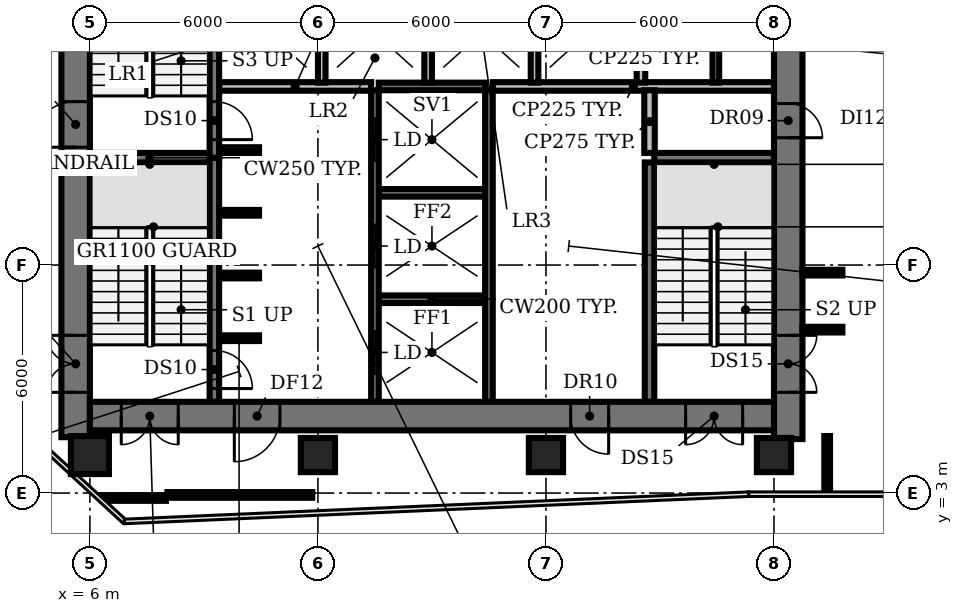
"""IFC4 building model, lengths in metres.
Left out: names, types, materials, properties, quantities, classifications, styles, units other than length and angle.
Written with IfcOpenShell. Run it as: python <this file> out.ifc"""

import sys

from ifc_helpers import new_model, si_unit, direction, frame, frame_2d, origin, origin_2d, place, context, subcontext, project, spatial, rectangle, circle, extrude, element, fill, save


model = new_model("IFC4")
c1 = context("Model", 3, precision=1e-05, world=origin(), true_north=direction((0.0, 1.0)))
c2 = subcontext(c1, "Body", "Model", "MODEL_VIEW")
j1 = project(units=[si_unit("LENGTHUNIT", "METRE"), si_unit("PLANEANGLEUNIT", "RADIAN")], contexts=[c1])
p1 = place(None, origin())
s1 = spatial("IfcSite", under=j1, at=p1, CompositionType="ELEMENT")
p2 = place(p1, origin())
s2 = spatial("IfcBuilding", under=s1, at=p2, CompositionType="ELEMENT")
p3 = place(p2, frame((0.0, 0.0, 100.4)))
s3 = spatial("IfcBuildingStorey", under=s2, at=p3, CompositionType="ELEMENT", Elevation=100.4)
p4 = place(p3, frame((6.0, 4.0, 0.0), z_axis=(0.0, 0.0, 1.0), x_axis=(1.0, 0.0, 0.0)))
e1 = element("IfcColumn", 1, at=p4, inside=s3, PredefinedType="COLUMN", context=c2, shape_type="SweptSolid", body=[
    extrude(circle(Radius=0.5, at=origin_2d()), origin(), (0.0, 0.0, 1.0), 3.85),
])
for number, where, z_axis, x_axis in (
    (2, (12.0, 4.0, 0.0), (0.0, 0.0, 1.0), (1.0, 0.0, 0.0)),
    (3, (18.0, 4.0, 0.0), (0.0, 0.0, 1.0), (1.0, 0.0, 0.0)),
    (4, (24.0, 4.0, 0.0), (0.0, 0.0, 1.0), (1.0, 0.0, 0.0)),
):
    element("IfcColumn", number, at=place(p3, frame(where, z_axis=z_axis, x_axis=x_axis)), inside=s3, PredefinedType="COLUMN", context=c2, shape_type="SweptSolid", body=[
        extrude(rectangle(XDim=0.9, YDim=0.9, at=origin_2d()), origin(), (0.0, 0.0, 1.0), 3.85),
    ])
p5 = place(p3, frame((9.4, 7.075, 0.0), z_axis=(0.0, 0.0, 1.0), x_axis=(1.0, 0.0, 0.0)))
e5 = element("IfcWall", 5, at=p5, inside=s3, PredefinedType="SHEAR", context=c2, shape_type="SweptSolid", body=[
    extrude(rectangle(XDim=1.05, YDim=0.15, at=frame_2d((0.525, 0.0))), origin(), (0.0, 0.0, 1.0), 3.85),
])
p6 = place(p3, frame((13.6, 8.1, 0.0), z_axis=(0.0, 0.0, 1.0), x_axis=(1.0, 0.0, 0.0)))
e6 = element("IfcWall", 6, at=p6, inside=s3, PredefinedType="SHEAR", context=c2, shape_type="SweptSolid", body=[
    extrude(rectangle(XDim=2.8, YDim=0.2, at=frame_2d((1.4, 0.0))), origin(), (0.0, 0.0, 1.0), 3.85),
])
for number, where, z_axis, x_axis in (
    (7, (9.4, 8.725, 0.0), (0.0, 0.0, 1.0), (1.0, 0.0, 0.0)),
    (8, (9.4, 10.375, 0.0), (0.0, 0.0, 1.0), (1.0, 0.0, 0.0)),
):
    element("IfcWall", number, at=place(p3, frame(where, z_axis=z_axis, x_axis=x_axis)), inside=s3, PredefinedType="SHEAR", context=c2, shape_type="SweptSolid", body=[
        extrude(rectangle(XDim=1.05, YDim=0.15, at=frame_2d((0.525, 0.0))), origin(), (0.0, 0.0, 1.0), 3.85),
    ])
p7 = place(p3, frame((13.6, 10.9, 0.0), z_axis=(0.0, 0.0, 1.0), x_axis=(1.0, 0.0, 0.0)))
e9 = element("IfcWall", 9, at=p7, inside=s3, PredefinedType="SHEAR", context=c2, shape_type="SweptSolid", body=[
    extrude(rectangle(XDim=2.8, YDim=0.2, at=frame_2d((1.4, 0.0))), origin(), (0.0, 0.0, 1.0), 3.85),
])
for number, where, z_axis, x_axis in (
    (10, (6.0, 11.825, 0.0), (0.0, 0.0, 1.0), (1.0, 0.0, 0.0)),
    (11, (20.85, 11.825, 0.0), (0.0, 0.0, 1.0), (1.0, 0.0, 0.0)),
):
    element("IfcWall", number, at=place(p3, frame(where, z_axis=z_axis, x_axis=x_axis)), inside=s3, PredefinedType="SHEAR", context=c2, shape_type="SweptSolid", body=[
        extrude(rectangle(XDim=3.15, YDim=0.25, at=frame_2d((1.575, 0.0))), origin(), (0.0, 0.0, 1.0), 3.85),
    ])
p8 = place(p3, frame((9.4, 12.025, 0.0), z_axis=(0.0, 0.0, 1.0), x_axis=(1.0, 0.0, 0.0)))
e12 = element("IfcWall", 12, at=p8, inside=s3, PredefinedType="SHEAR", context=c2, shape_type="SweptSolid", body=[
    extrude(rectangle(XDim=1.05, YDim=0.15, at=frame_2d((0.525, 0.0))), origin(), (0.0, 0.0, 1.0), 3.85),
])
p9 = place(p3, frame((9.4, 13.7, 0.0), z_axis=(0.0, 0.0, 1.0), x_axis=(1.0, 0.0, 0.0)))
e13 = element("IfcWall", 13, at=p9, inside=s3, PredefinedType="PARTITIONING", context=c2, shape_type="SweptSolid", body=[
    extrude(rectangle(XDim=4.0, YDim=0.225, at=frame_2d((2.0, 0.0))), origin(), (0.0, 0.0, 1.0), 3.85),
])
p10 = place(p3, frame((13.6, 13.7, 0.0), z_axis=(0.0, 0.0, 1.0), x_axis=(1.0, 0.0, 0.0)))
e14 = element("IfcWall", 14, at=p10, inside=s3, PredefinedType="SHEAR", context=c2, shape_type="SweptSolid", body=[
    extrude(rectangle(XDim=2.8, YDim=0.2, at=frame_2d((1.4, 0.0))), origin(), (0.0, 0.0, 1.0), 3.85),
])
p11 = place(p3, frame((16.6, 13.7, 0.0), z_axis=(0.0, 0.0, 1.0), x_axis=(1.0, 0.0, 0.0)))
e15 = element("IfcWall", 15, at=p11, inside=s3, PredefinedType="PARTITIONING", context=c2, shape_type="SweptSolid", body=[
    extrude(rectangle(XDim=7.4, YDim=0.225, at=frame_2d((3.7, 0.0))), origin(), (0.0, 0.0, 1.0), 3.85),
])
p12 = place(p3, frame((9.275, 11.825, 0.0), z_axis=(0.0, 0.0, 1.0), x_axis=(0.0, -1.0, 0.0)))
e16 = element("IfcWall", 16, at=p12, inside=s3, PredefinedType="SHEAR", context=c2, shape_type="SweptSolid", body=[
    extrude(rectangle(XDim=6.425, YDim=0.25, at=frame_2d((3.212, 0.0))), origin(), (0.0, 0.0, 1.0), 3.85),
])
p13 = place(p12, frame((5.075, 0.0, 0.0)))
e17 = element("IfcOpeningElement", 17, at=p13, cuts=e16, PredefinedType="OPENING", context=c2, shape_type="SweptSolid", body=[
    extrude(rectangle(XDim=1.0, YDim=2.1, at=frame_2d((0.5, 1.05))), frame((0.0, 0.135, 0.0), z_axis=(0.0, -1.0, 0.0), x_axis=(1.0, 0.0, 0.0)), (0.0, 0.0, 1.0), 0.27),
])
p14 = place(p3, frame((9.275, 18.375, 0.0), z_axis=(0.0, 0.0, 1.0), x_axis=(0.0, -1.0, 0.0)))
e18 = element("IfcWall", 18, at=p14, inside=s3, PredefinedType="SHEAR", context=c2, shape_type="SweptSolid", body=[
    extrude(rectangle(XDim=6.55, YDim=0.25, at=frame_2d((3.275, 0.0))), origin(), (0.0, 0.0, 1.0), 3.85),
])
p15 = place(p14, frame((5.075, 0.0, 0.0)))
e19 = element("IfcOpeningElement", 19, at=p15, cuts=e18, PredefinedType="OPENING", context=c2, shape_type="SweptSolid", body=[
    extrude(rectangle(XDim=1.0, YDim=2.1, at=frame_2d((0.5, 1.05))), frame((0.0, 0.135, 0.0), z_axis=(0.0, -1.0, 0.0), x_axis=(1.0, 0.0, 0.0)), (0.0, 0.0, 1.0), 0.27),
])
p16 = place(p3, frame((12.1, 13.8, 0.0), z_axis=(0.0, 0.0, 1.0), x_axis=(0.0, 1.0, 0.0)))
e20 = element("IfcWall", 20, at=p16, inside=s3, PredefinedType="SOLIDWALL", context=c2, shape_type="SweptSolid", body=[
    extrude(rectangle(XDim=2.6, YDim=0.2, at=frame_2d((1.3, 0.0))), origin(), (0.0, 0.0, 1.0), 3.85),
])
p17 = place(p3, frame((13.5, 5.4, 0.0), z_axis=(0.0, 0.0, 1.0), x_axis=(0.0, 1.0, 0.0)))
e21 = element("IfcWall", 21, at=p17, inside=s3, PredefinedType="SHEAR", context=c2, shape_type="SweptSolid", body=[
    extrude(rectangle(XDim=8.2, YDim=0.2, at=frame_2d((4.1, 0.0))), origin(), (0.0, 0.0, 1.0), 3.85),
])
p18 = place(p17, frame((0.75, 0.0, 0.0)))
e22 = element("IfcOpeningElement", 22, at=p18, cuts=e21, PredefinedType="OPENING", context=c2, shape_type="SweptSolid", body=[
    extrude(rectangle(XDim=1.1, YDim=2.1, at=frame_2d((0.55, 1.05))), frame((0.0, 0.11, 0.0), z_axis=(0.0, -1.0, 0.0), x_axis=(1.0, 0.0, 0.0)), (0.0, 0.0, 1.0), 0.22),
])
p19 = place(p17, frame((3.55, 0.0, 0.0)))
e23 = element("IfcOpeningElement", 23, at=p19, cuts=e21, PredefinedType="OPENING", context=c2, shape_type="SweptSolid", body=[
    extrude(rectangle(XDim=1.1, YDim=2.1, at=frame_2d((0.55, 1.05))), frame((0.0, 0.11, 0.0), z_axis=(0.0, -1.0, 0.0), x_axis=(1.0, 0.0, 0.0)), (0.0, 0.0, 1.0), 0.22),
])
p20 = place(p17, frame((6.35, 0.0, 0.0)))
e24 = element("IfcOpeningElement", 24, at=p20, cuts=e21, PredefinedType="OPENING", context=c2, shape_type="SweptSolid", body=[
    extrude(rectangle(XDim=1.1, YDim=2.1, at=frame_2d((0.55, 1.05))), frame((0.0, 0.11, 0.0), z_axis=(0.0, -1.0, 0.0), x_axis=(1.0, 0.0, 0.0)), (0.0, 0.0, 1.0), 0.22),
])
p21 = place(p3, frame((14.9, 13.8, 0.0), z_axis=(0.0, 0.0, 1.0), x_axis=(0.0, 1.0, 0.0)))
e25 = element("IfcWall", 25, at=p21, inside=s3, PredefinedType="SOLIDWALL", context=c2, shape_type="SweptSolid", body=[
    extrude(rectangle(XDim=2.6, YDim=0.2, at=frame_2d((1.3, 0.0))), origin(), (0.0, 0.0, 1.0), 3.85),
])
p22 = place(p3, frame((16.5, 5.4, 0.0), z_axis=(0.0, 0.0, 1.0), x_axis=(0.0, 1.0, 0.0)))
e26 = element("IfcWall", 26, at=p22, inside=s3, PredefinedType="SHEAR", context=c2, shape_type="SweptSolid", body=[
    extrude(rectangle(XDim=8.2, YDim=0.2, at=frame_2d((4.1, 0.0))), origin(), (0.0, 0.0, 1.0), 3.85),
])
p23 = place(p3, frame((17.7, 13.8, 0.0), z_axis=(0.0, 0.0, 1.0), x_axis=(0.0, 1.0, 0.0)))
e27 = element("IfcWall", 27, at=p23, inside=s3, PredefinedType="SOLIDWALL", context=c2, shape_type="SweptSolid", body=[
    extrude(rectangle(XDim=2.6, YDim=0.2, at=frame_2d((1.3, 0.0))), origin(), (0.0, 0.0, 1.0), 3.85),
])
p24 = place(p3, frame((20.5, 13.8, 0.0), z_axis=(0.0, 0.0, 1.0), x_axis=(0.0, 1.0, 0.0)))
e28 = element("IfcWall", 28, at=p24, inside=s3, PredefinedType="PARTITIONING", context=c2, shape_type="SweptSolid", body=[
    extrude(rectangle(XDim=2.6, YDim=0.225, at=frame_2d((1.3, 0.0))), origin(), (0.0, 0.0, 1.0), 3.85),
])
p25 = place(p3, frame((20.725, 5.4, 0.0), z_axis=(0.0, 0.0, 1.0), x_axis=(0.0, 1.0, 0.0)))
e29 = element("IfcWall", 29, at=p25, inside=s3, PredefinedType="SHEAR", context=c2, shape_type="SweptSolid", body=[
    extrude(rectangle(XDim=6.3, YDim=0.25, at=frame_2d((3.15, 0.0))), origin(), (0.0, 0.0, 1.0), 3.85),
])
p26 = place(p3, frame((20.725, 11.95, 0.0), z_axis=(0.0, 0.0, 1.0), x_axis=(0.0, 1.0, 0.0)))
e30 = element("IfcWall", 30, at=p26, inside=s3, PredefinedType="PARTITIONING", context=c2, shape_type="SweptSolid", body=[
    extrude(rectangle(XDim=1.65, YDim=0.275, at=frame_2d((0.825, 0.0))), origin(), (0.0, 0.0, 1.0), 3.85),
])
p27 = place(p3, frame((22.47, 13.8, 0.0), z_axis=(0.0, 0.0, 1.0), x_axis=(0.0, 1.0, 0.0)))
e31 = element("IfcWall", 31, at=p27, inside=s3, PredefinedType="PARTITIONING", context=c2, shape_type="SweptSolid", body=[
    extrude(rectangle(XDim=2.6, YDim=0.175, at=frame_2d((1.3, 0.0))), origin(), (0.0, 0.0, 1.0), 3.85),
])
p28 = place(p3, frame((5.625, 4.47, 0.0), z_axis=(0.0, 0.0, 1.0), x_axis=(0.0, 1.0, 0.0)))
e32 = element("IfcWall", 32, at=p28, inside=s3, PredefinedType="SHEAR", context=c2, shape_type="SweptSolid", body=[
    extrude(rectangle(XDim=21.08, YDim=0.75, at=frame_2d((10.54, 0.0))), origin(), (0.0, 0.0, 1.0), 3.85),
])
p29 = place(p28, frame((1.18, 0.0, 0.0)))
e33 = element("IfcOpeningElement", 33, at=p29, cuts=e32, PredefinedType="OPENING", context=c2, shape_type="SweptSolid", body=[
    extrude(rectangle(XDim=1.5, YDim=2.1, at=frame_2d((0.75, 1.05))), frame((0.0, 0.385, 0.0), z_axis=(0.0, -1.0, 0.0), x_axis=(1.0, 0.0, 0.0)), (0.0, 0.0, 1.0), 0.77),
])
p30 = place(p28, frame((7.63, 0.0, 0.0)))
e34 = element("IfcOpeningElement", 34, at=p30, cuts=e32, PredefinedType="OPENING", context=c2, shape_type="SweptSolid", body=[
    extrude(rectangle(XDim=1.2, YDim=2.1, at=frame_2d((0.6, 1.05))), frame((0.0, 0.385, 0.0), z_axis=(0.0, -1.0, 0.0), x_axis=(1.0, 0.0, 0.0)), (0.0, 0.0, 1.0), 0.77),
])
p31 = place(p28, frame((14.18, 0.0, 0.0)))
e35 = element("IfcOpeningElement", 35, at=p31, cuts=e32, PredefinedType="OPENING", context=c2, shape_type="SweptSolid", body=[
    extrude(rectangle(XDim=1.2, YDim=2.1, at=frame_2d((0.6, 1.05))), frame((0.0, 0.385, 0.0), z_axis=(0.0, -1.0, 0.0), x_axis=(1.0, 0.0, 0.0)), (0.0, 0.0, 1.0), 0.77),
])
p32 = place(p3, frame((24.375, 25.55, 0.0), z_axis=(0.0, 0.0, 1.0), x_axis=(0.0, -1.0, 0.0)))
e36 = element("IfcWall", 36, at=p32, inside=s3, PredefinedType="SHEAR", context=c2, shape_type="SweptSolid", body=[
    extrude(rectangle(XDim=21.13, YDim=0.75, at=frame_2d((10.565, 0.0))), origin(), (0.0, 0.0, 1.0), 3.85),
])
p33 = place(p32, frame((18.4, 0.0, 0.0)))
e37 = element("IfcOpeningElement", 37, at=p33, cuts=e36, PredefinedType="OPENING", context=c2, shape_type="SweptSolid", body=[
    extrude(rectangle(XDim=1.5, YDim=2.1, at=frame_2d((0.75, 1.05))), frame((0.0, 0.385, 0.0), z_axis=(0.0, -1.0, 0.0), x_axis=(1.0, 0.0, 0.0)), (0.0, 0.0, 1.0), 0.77),
])
p34 = place(p32, frame((12.3, 0.0, 0.0)))
e38 = element("IfcOpeningElement", 38, at=p34, cuts=e36, PredefinedType="OPENING", context=c2, shape_type="SweptSolid", body=[
    extrude(rectangle(XDim=0.9, YDim=2.1, at=frame_2d((0.45, 1.05))), frame((0.0, 0.385, 0.0), z_axis=(0.0, -1.0, 0.0), x_axis=(1.0, 0.0, 0.0)), (0.0, 0.0, 1.0), 0.77),
])
p35 = place(p32, frame((6.3, 0.0, 0.0)))
e39 = element("IfcOpeningElement", 39, at=p35, cuts=e36, PredefinedType="OPENING", context=c2, shape_type="SweptSolid", body=[
    extrude(rectangle(XDim=2.0, YDim=2.1, at=frame_2d((1.0, 1.05))), frame((0.0, 0.385, 0.0), z_axis=(0.0, -1.0, 0.0), x_axis=(1.0, 0.0, 0.0)), (0.0, 0.0, 1.0), 0.77),
])
p36 = place(p3, frame((24.0, 5.025, 0.0), z_axis=(0.0, 0.0, 1.0), x_axis=(-1.0, 0.0, 0.0)))
e40 = element("IfcWall", 40, at=p36, inside=s3, PredefinedType="SHEAR", context=c2, shape_type="SweptSolid", body=[
    extrude(rectangle(XDim=18.0, YDim=0.75, at=frame_2d((9.0, 0.0))), origin(), (0.0, 0.0, 1.0), 3.85),
])
p37 = place(p36, frame((0.825, 0.0, 0.0)))
e41 = element("IfcOpeningElement", 41, at=p37, cuts=e40, PredefinedType="OPENING", context=c2, shape_type="SweptSolid", body=[
    extrude(rectangle(XDim=1.5, YDim=2.1, at=frame_2d((0.75, 1.05))), frame((0.0, 0.385, 0.0), z_axis=(0.0, -1.0, 0.0), x_axis=(1.0, 0.0, 0.0)), (0.0, 0.0, 1.0), 0.77),
])
p38 = place(p36, frame((15.675, 0.0, 0.0)))
e42 = element("IfcOpeningElement", 42, at=p38, cuts=e40, PredefinedType="OPENING", context=c2, shape_type="SweptSolid", body=[
    extrude(rectangle(XDim=1.5, YDim=2.1, at=frame_2d((0.75, 1.05))), frame((0.0, 0.385, 0.0), z_axis=(0.0, -1.0, 0.0), x_axis=(1.0, 0.0, 0.0)), (0.0, 0.0, 1.0), 0.77),
])
p39 = place(p36, frame((13.0, 0.0, 0.0)))
e43 = element("IfcOpeningElement", 43, at=p39, cuts=e40, PredefinedType="OPENING", context=c2, shape_type="SweptSolid", body=[
    extrude(rectangle(XDim=1.2, YDim=2.1, at=frame_2d((0.6, 1.05))), frame((0.0, 0.385, 0.0), z_axis=(0.0, -1.0, 0.0), x_axis=(1.0, 0.0, 0.0)), (0.0, 0.0, 1.0), 0.77),
])
p40 = place(p36, frame((4.35, 0.0, 0.0)))
e44 = element("IfcOpeningElement", 44, at=p40, cuts=e40, PredefinedType="OPENING", context=c2, shape_type="SweptSolid", body=[
    extrude(rectangle(XDim=1.0, YDim=2.1, at=frame_2d((0.5, 1.05))), frame((0.0, 0.385, 0.0), z_axis=(0.0, -1.0, 0.0), x_axis=(1.0, 0.0, 0.0)), (0.0, 0.0, 1.0), 0.77),
])
p41 = place(p3, frame((6.326, 2.87, 0.0), z_axis=(0.0, 0.0, 1.0), x_axis=(1.0, 0.0, 0.0)))
e45 = element("IfcWall", 45, at=p41, inside=s3, PredefinedType="PARTITIONING", context=c2, shape_type="SweptSolid", body=[
    extrude(rectangle(XDim=1.674, YDim=0.15, at=frame_2d((0.837, 0.0))), origin(), (0.0, 0.0, 1.0), 2.83),
])
p42 = place(p3, frame((8.04, 2.95, 0.0), z_axis=(0.0, 0.0, 1.0), x_axis=(1.0, 0.0, 0.0)))
e46 = element("IfcWall", 46, at=p42, inside=s3, PredefinedType="PARTITIONING", context=c2, shape_type="SweptSolid", body=[
    extrude(rectangle(XDim=3.81, YDim=0.15, at=frame_2d((1.905, 0.0))), origin(), (0.0, 0.0, 1.0), 2.83),
])
for number, where, z_axis, x_axis in (
    (47, (24.75, 7.3, 0.0), (0.0, 0.0, 1.0), (1.0, 0.0, 0.0)),
    (48, (24.75, 8.8, 0.0), (0.0, 0.0, 1.0), (1.0, 0.0, 0.0)),
):
    element("IfcWall", number, at=place(p3, frame(where, z_axis=z_axis, x_axis=x_axis)), inside=s3, PredefinedType="PARTITIONING", context=c2, shape_type="SweptSolid", body=[
        extrude(rectangle(XDim=1.05, YDim=0.15, at=frame_2d((0.525, 0.0))), origin(), (0.0, 0.0, 1.0), 2.83),
    ])
p43 = place(p3, frame((25.4, 3.02, 0.0), z_axis=(0.0, 0.0, 1.0), x_axis=(0.0, 1.0, 0.0)))
e49 = element("IfcWall", 49, at=p43, inside=s3, PredefinedType="PARTITIONING", context=c2, shape_type="SweptSolid", body=[
    extrude(rectangle(XDim=1.48, YDim=0.15, at=frame_2d((0.74, 0.0))), origin(), (0.0, 0.0, 1.0), 2.83),
])
p44 = place(p13, origin())
e50 = element("IfcDoor", 50, at=p44, inside=s3, OperationType="SINGLE_SWING_RIGHT", PredefinedType="DOOR", context=c2, shape_type="SweptSolid", body=[
    extrude(rectangle(XDim=1.0, YDim=2.1, at=frame_2d((0.5, 1.05))), frame((0.0, 0.025, 0.0), z_axis=(0.0, -1.0, 0.0), x_axis=(1.0, 0.0, 0.0)), (0.0, 0.0, 1.0), 0.05),
])
fill(e17, e50)
p45 = place(p15, origin())
e51 = element("IfcDoor", 51, at=p45, inside=s3, OperationType="SINGLE_SWING_RIGHT", PredefinedType="DOOR", context=c2, shape_type="SweptSolid", body=[
    extrude(rectangle(XDim=1.0, YDim=2.1, at=frame_2d((0.5, 1.05))), frame((0.0, 0.025, 0.0), z_axis=(0.0, -1.0, 0.0), x_axis=(1.0, 0.0, 0.0)), (0.0, 0.0, 1.0), 0.05),
])
fill(e19, e51)
p46 = place(p18, origin())
e52 = element("IfcDoor", 52, at=p46, inside=s3, OperationType="DOUBLE_DOOR_SLIDING", PredefinedType="DOOR", context=c2, shape_type="SweptSolid", body=[
    extrude(rectangle(XDim=1.1, YDim=2.1, at=frame_2d((0.55, 1.05))), frame((0.0, 0.025, 0.0), z_axis=(0.0, -1.0, 0.0), x_axis=(1.0, 0.0, 0.0)), (0.0, 0.0, 1.0), 0.05),
])
fill(e22, e52)
p47 = place(p19, origin())
e53 = element("IfcDoor", 53, at=p47, inside=s3, OperationType="DOUBLE_DOOR_SLIDING", PredefinedType="DOOR", context=c2, shape_type="SweptSolid", body=[
    extrude(rectangle(XDim=1.1, YDim=2.1, at=frame_2d((0.55, 1.05))), frame((0.0, 0.025, 0.0), z_axis=(0.0, -1.0, 0.0), x_axis=(1.0, 0.0, 0.0)), (0.0, 0.0, 1.0), 0.05),
])
fill(e23, e53)
p48 = place(p20, origin())
e54 = element("IfcDoor", 54, at=p48, inside=s3, OperationType="DOUBLE_DOOR_SLIDING", PredefinedType="DOOR", context=c2, shape_type="SweptSolid", body=[
    extrude(rectangle(XDim=1.1, YDim=2.1, at=frame_2d((0.55, 1.05))), frame((0.0, 0.025, 0.0), z_axis=(0.0, -1.0, 0.0), x_axis=(1.0, 0.0, 0.0)), (0.0, 0.0, 1.0), 0.05),
])
fill(e24, e54)
p49 = place(p29, origin())
e55 = element("IfcDoor", 55, at=p49, inside=s3, OperationType="DOUBLE_DOOR_SINGLE_SWING", PredefinedType="DOOR", context=c2, shape_type="SweptSolid", body=[
    extrude(rectangle(XDim=1.5, YDim=2.1, at=frame_2d((0.75, 1.05))), frame((0.0, 0.025, 0.0), z_axis=(0.0, -1.0, 0.0), x_axis=(1.0, 0.0, 0.0)), (0.0, 0.0, 1.0), 0.05),
])
fill(e33, e55)
p50 = place(p30, origin())
e56 = element("IfcDoor", 56, at=p50, inside=s3, OperationType="SINGLE_SWING_LEFT", PredefinedType="DOOR", context=c2, shape_type="SweptSolid", body=[
    extrude(rectangle(XDim=1.2, YDim=2.1, at=frame_2d((0.6, 1.05))), frame((0.0, 0.025, 0.0), z_axis=(0.0, -1.0, 0.0), x_axis=(1.0, 0.0, 0.0)), (0.0, 0.0, 1.0), 0.05),
])
fill(e34, e56)
p51 = place(p33, origin())
e57 = element("IfcDoor", 57, at=p51, inside=s3, OperationType="DOUBLE_DOOR_SINGLE_SWING", PredefinedType="DOOR", context=c2, shape_type="SweptSolid", body=[
    extrude(rectangle(XDim=1.5, YDim=2.1, at=frame_2d((0.75, 1.05))), frame((0.0, 0.025, 0.0), z_axis=(0.0, -1.0, 0.0), x_axis=(1.0, 0.0, 0.0)), (0.0, 0.0, 1.0), 0.05),
])
fill(e37, e57)
p52 = place(p34, origin())
e58 = element("IfcDoor", 58, at=p52, inside=s3, OperationType="SINGLE_SWING_RIGHT", PredefinedType="DOOR", context=c2, shape_type="SweptSolid", body=[
    extrude(rectangle(XDim=0.9, YDim=2.1, at=frame_2d((0.45, 1.05))), frame((0.0, -0.315, 0.0), z_axis=(0.0, -1.0, 0.0), x_axis=(1.0, 0.0, 0.0)), (0.0, 0.0, 1.0), 0.05),
])
fill(e38, e58)
p53 = place(p37, origin())
e59 = element("IfcDoor", 59, at=p53, inside=s3, OperationType="DOUBLE_DOOR_SINGLE_SWING", PredefinedType="DOOR", context=c2, shape_type="SweptSolid", body=[
    extrude(rectangle(XDim=1.5, YDim=2.1, at=frame_2d((0.75, 1.05))), frame((0.0, 0.025, 0.0), z_axis=(0.0, -1.0, 0.0), x_axis=(1.0, 0.0, 0.0)), (0.0, 0.0, 1.0), 0.05),
])
fill(e41, e59)
p54 = place(p38, origin())
e60 = element("IfcDoor", 60, at=p54, inside=s3, OperationType="DOUBLE_DOOR_SINGLE_SWING", PredefinedType="DOOR", context=c2, shape_type="SweptSolid", body=[
    extrude(rectangle(XDim=1.5, YDim=2.1, at=frame_2d((0.75, 1.05))), frame((0.0, 0.025, 0.0), z_axis=(0.0, -1.0, 0.0), x_axis=(1.0, 0.0, 0.0)), (0.0, 0.0, 1.0), 0.05),
])
fill(e42, e60)
p55 = place(p39, origin())
e61 = element("IfcDoor", 61, at=p55, inside=s3, OperationType="SINGLE_SWING_RIGHT", PredefinedType="DOOR", context=c2, shape_type="SweptSolid", body=[
    extrude(rectangle(XDim=1.2, YDim=2.1, at=frame_2d((0.6, 1.05))), frame((0.0, 0.025, 0.0), z_axis=(0.0, -1.0, 0.0), x_axis=(1.0, 0.0, 0.0)), (0.0, 0.0, 1.0), 0.05),
])
fill(e43, e61)
p56 = place(p40, origin())
e62 = element("IfcDoor", 62, at=p56, inside=s3, OperationType="SINGLE_SWING_LEFT", PredefinedType="DOOR", context=c2, shape_type="SweptSolid", body=[
    extrude(rectangle(XDim=1.0, YDim=2.1, at=frame_2d((0.5, 1.05))), frame((0.0, -0.315, 0.0), z_axis=(0.0, -1.0, 0.0), x_axis=(1.0, 0.0, 0.0)), (0.0, 0.0, 1.0), 0.05),
])
fill(e44, e62)
save(model, sys.argv[1])
